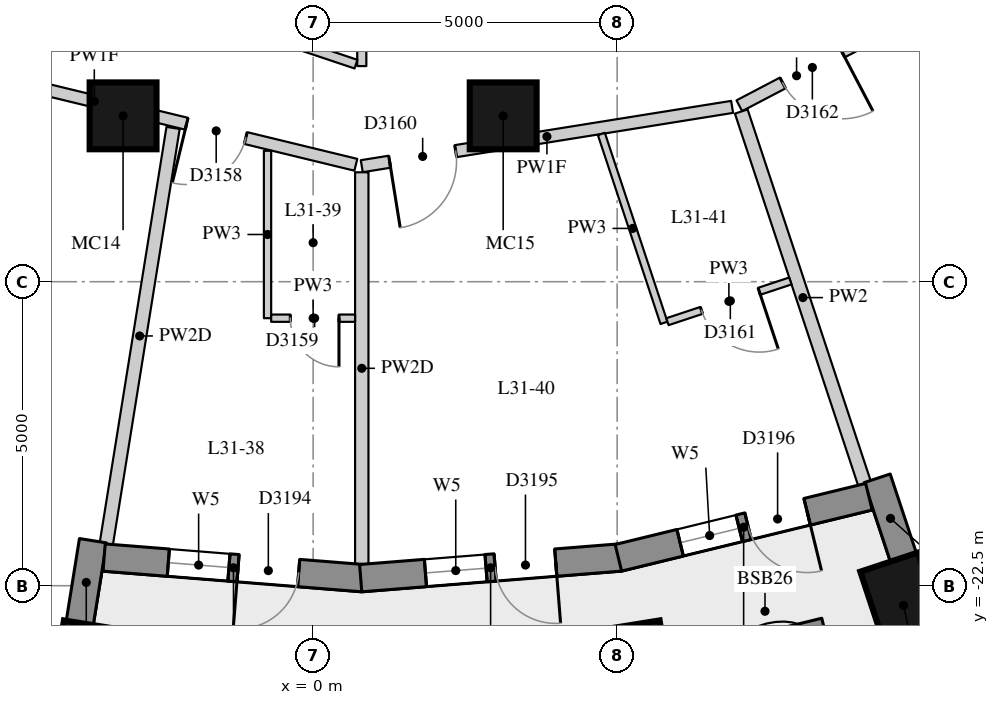
"""IFC4 building model, lengths in metres.
Left out: names, types, materials, properties, quantities, classifications, styles, units other than length and angle.
Written with IfcOpenShell. Run it as: python <this file> out.ifc"""

import sys

from ifc_helpers import new_model, si_unit, direction, frame, frame_2d, origin, origin_2d, place, context, subcontext, project, spatial, rectangle, extrude, element, fill, save


model = new_model("IFC4")
c1 = context("Model", 3, precision=1e-05, world=origin(), true_north=direction((0.0, 1.0)))
c2 = subcontext(c1, "Body", "Model", "MODEL_VIEW")
j1 = project(units=[si_unit("LENGTHUNIT", "METRE"), si_unit("PLANEANGLEUNIT", "RADIAN")], contexts=[c1])
p1 = place(None, origin())
s1 = spatial("IfcSite", under=j1, at=p1, CompositionType="ELEMENT")
p2 = place(p1, origin())
s2 = spatial("IfcBuilding", under=s1, at=p2, CompositionType="ELEMENT")
p3 = place(p2, frame((0.0, 0.0, 112.0)))
s3 = spatial("IfcBuildingStorey", under=s2, at=p3, CompositionType="ELEMENT", Elevation=112.0)
for number, where, z_axis, x_axis in (
    (1, (-3.724, -23.891, 0.0), (0.0, 0.0, 1.0), (-0.159, -0.987, 0.0)),
    (2, (5.323, -23.891, 0.0), (0.0, 0.0, 1.0), (0.159, -0.987, 0.0)),
    (3, (9.71, -22.824, 0.0), (0.0, 0.0, 1.0), (0.315, -0.949, 0.0)),
):
    element("IfcColumn", number, at=place(p3, frame(where, z_axis=z_axis, x_axis=x_axis)), inside=s3, PredefinedType="COLUMN", context=c2, shape_type="SweptSolid", body=[
        extrude(rectangle(XDim=1.5, YDim=1.0, at=origin_2d()), origin(), (0.0, 0.0, 1.0), 3.3),
    ])
for number, where, z_axis, x_axis in (
    (4, (-3.126, -14.772, 0.0), (0.0, 0.0, 1.0), (1.0, 0.0, 0.0)),
    (5, (3.126, -14.772, 0.0), (0.0, 0.0, 1.0), (1.0, 0.0, 0.0)),
):
    element("IfcColumn", number, at=place(p3, frame(where, z_axis=z_axis, x_axis=x_axis)), inside=s3, PredefinedType="COLUMN", context=c2, shape_type="SweptSolid", body=[
        extrude(rectangle(XDim=1.1, YDim=1.1, at=origin_2d()), origin(), (0.0, 0.0, 1.0), 3.3),
    ])
p4 = place(p3, frame((-3.841, -23.132, 0.0), z_axis=(0.0, 0.0, 1.0), x_axis=(0.158442643832, 0.987368182906, 0.0)))
e6 = element("IfcWall", 6, at=p4, inside=s3, PredefinedType="SOLIDWALL", context=c2, shape_type="SweptSolid", body=[
    extrude(rectangle(XDim=1.39, YDim=0.45, at=frame_2d((0.695, 0.0))), origin(), (0.0, 0.0, 1.0), 2.47),
])
p5 = place(p3, frame((9.714, -22.053, 0.0), z_axis=(0.0, 0.0, 1.0), x_axis=(-0.314647068585, 0.949208734805, 0.0)))
e7 = element("IfcWall", 7, at=p5, inside=s3, PredefinedType="SOLIDWALL", context=c2, shape_type="SweptSolid", body=[
    extrude(rectangle(XDim=1.39, YDim=0.45, at=frame_2d((0.695, 0.0))), origin(), (0.0, 0.0, 1.0), 3.02),
])
p6 = place(p3, frame((-3.438, -22.037, 0.0), z_axis=(0.0, 0.0, 1.0), x_axis=(0.996844307919, -0.079381520332, 0.0)))
e8 = element("IfcWall", 8, at=p6, inside=s3, PredefinedType="SOLIDWALL", context=c2, shape_type="SweptSolid", body=[
    extrude(rectangle(XDim=4.269, YDim=0.45, at=frame_2d((2.134, 0.0))), origin(), (0.0, 0.0, 1.0), 3.02),
])
p7 = place(p6, frame((1.06, 0.0, 0.4)))
e9 = element("IfcOpeningElement", 9, at=p7, cuts=e8, PredefinedType="OPENING", context=c2, shape_type="SweptSolid", body=[
    extrude(rectangle(XDim=1.0, YDim=1.75, at=frame_2d((0.5, 0.875))), frame((0.0, 0.235, 0.0), z_axis=(0.0, -1.0, 0.0), x_axis=(1.0, 0.0, 0.0)), (0.0, 0.0, 1.0), 0.47),
])
p8 = place(p6, frame((2.209, 0.0, 0.0)))
e10 = element("IfcOpeningElement", 10, at=p8, cuts=e8, PredefinedType="OPENING", context=c2, shape_type="SweptSolid", body=[
    extrude(rectangle(XDim=1.0, YDim=2.15, at=frame_2d((0.5, 1.075))), frame((0.0, 0.235, 0.0), z_axis=(0.0, -1.0, 0.0), x_axis=(1.0, 0.0, 0.0)), (0.0, 0.0, 1.0), 0.47),
])
p9 = place(p3, frame((0.782, -22.376, 0.0), z_axis=(0.0, 0.0, 1.0), x_axis=(0.996843465986, 0.079392092303, 0.0)))
e11 = element("IfcWall", 11, at=p9, inside=s3, PredefinedType="SOLIDWALL", context=c2, shape_type="SweptSolid", body=[
    extrude(rectangle(XDim=4.287, YDim=0.45, at=frame_2d((2.143, 0.0))), origin(), (0.0, 0.0, 1.0), 3.02),
])
p10 = place(p9, frame((1.068, 0.0, 0.4)))
e12 = element("IfcOpeningElement", 12, at=p10, cuts=e11, PredefinedType="OPENING", context=c2, shape_type="SweptSolid", body=[
    extrude(rectangle(XDim=1.0, YDim=1.75, at=frame_2d((0.5, 0.875))), frame((0.0, 0.235, 0.0), z_axis=(0.0, -1.0, 0.0), x_axis=(1.0, 0.0, 0.0)), (0.0, 0.0, 1.0), 0.47),
])
p11 = place(p9, frame((2.219, 0.0, 0.0)))
e13 = element("IfcOpeningElement", 13, at=p11, cuts=e11, PredefinedType="OPENING", context=c2, shape_type="SweptSolid", body=[
    extrude(rectangle(XDim=1.0, YDim=2.15, at=frame_2d((0.5, 1.075))), frame((0.0, 0.235, 0.0), z_axis=(0.0, -1.0, 0.0), x_axis=(1.0, 0.0, 0.0)), (0.0, 0.0, 1.0), 0.47),
])
p12 = place(p3, frame((5.02, -22.041, 0.0), z_axis=(0.0, 0.0, 1.0), x_axis=(0.971521631711, 0.236950879125, 0.0)))
e14 = element("IfcWall", 14, at=p12, inside=s3, PredefinedType="SOLIDWALL", context=c2, shape_type="SweptSolid", body=[
    extrude(rectangle(XDim=4.241, YDim=0.45, at=frame_2d((2.121, 0.0))), origin(), (0.0, 0.0, 1.0), 3.02),
])
p13 = place(p12, frame((1.045, 0.0, 0.4)))
e15 = element("IfcOpeningElement", 15, at=p13, cuts=e14, PredefinedType="OPENING", context=c2, shape_type="SweptSolid", body=[
    extrude(rectangle(XDim=1.0, YDim=1.75, at=frame_2d((0.5, 0.875))), frame((0.0, 0.235, 0.0), z_axis=(0.0, -1.0, 0.0), x_axis=(1.0, 0.0, 0.0)), (0.0, 0.0, 1.0), 0.47),
])
p14 = place(p12, frame((2.196, 0.0, 0.0)))
e16 = element("IfcOpeningElement", 16, at=p14, cuts=e14, PredefinedType="OPENING", context=c2, shape_type="SweptSolid", body=[
    extrude(rectangle(XDim=1.0, YDim=2.15, at=frame_2d((0.5, 1.075))), frame((0.0, 0.235, 0.0), z_axis=(0.0, -1.0, 0.0), x_axis=(1.0, 0.0, 0.0)), (0.0, 0.0, 1.0), 0.47),
])
p15 = place(p3, frame((6.699, -23.801, 0.0), z_axis=(0.0, 0.0, 1.0), x_axis=(0.971654974133, 0.23640349245, 0.0)))
e17 = element("IfcWall", 17, at=p15, inside=s3, PredefinedType="USERDEFINED", context=c2, shape_type="SweptSolid", body=[
    extrude(rectangle(XDim=1.8, YDim=0.7, at=frame_2d((0.9, 0.0))), origin(), (0.0, 0.0, 1.0), 0.75),
])
p16 = place(p3, frame((8.892, -13.619, 0.0), z_axis=(0.0, 0.0, 1.0), x_axis=(-0.885696642175, -0.464264426852, 0.0)))
e18 = element("IfcWall", 18, at=p16, inside=s3, PredefinedType="PARTITIONING", context=c2, shape_type="SweptSolid", body=[
    extrude(rectangle(XDim=2.126, YDim=0.2, at=frame_2d((1.063, 0.0))), origin(), (0.0, 0.0, 1.0), 3.02),
])
p17 = place(p16, frame((0.22, 0.0, 0.0)))
e19 = element("IfcOpeningElement", 19, at=p17, cuts=e18, PredefinedType="OPENING", context=c2, shape_type="SweptSolid", body=[
    extrude(rectangle(XDim=1.1, YDim=2.1, at=frame_2d((0.55, 1.05))), frame((0.0, 0.11, 0.0), z_axis=(0.0, -1.0, 0.0), x_axis=(1.0, 0.0, 0.0)), (0.0, 0.0, 1.0), 0.22),
])
p18 = place(p3, frame((6.891, -14.625, 0.0), z_axis=(0.0, 0.0, 1.0), x_axis=(-0.987419134366, -0.158124802253, 0.0)))
e20 = element("IfcWall", 20, at=p18, inside=s3, PredefinedType="PARTITIONING", context=c2, shape_type="SweptSolid", body=[
    extrude(rectangle(XDim=6.168, YDim=0.2, at=frame_2d((3.084, 0.0))), origin(), (0.0, 0.0, 1.0), 2.42),
])
p19 = place(p18, frame((4.604, 0.0, 0.0)))
e21 = element("IfcOpeningElement", 21, at=p19, cuts=e20, PredefinedType="OPENING", context=c2, shape_type="SweptSolid", body=[
    extrude(rectangle(XDim=1.1, YDim=2.1, at=frame_2d((0.55, 1.05))), frame((0.0, 0.11, 0.0), z_axis=(0.0, -1.0, 0.0), x_axis=(1.0, 0.0, 0.0)), (0.0, 0.0, 1.0), 0.22),
])
p20 = place(p3, frame((0.702, -15.577, 0.0), z_axis=(0.0, 0.0, 1.0), x_axis=(-0.971804733873, 0.235787105715, 0.0)))
e22 = element("IfcWall", 22, at=p20, inside=s3, PredefinedType="PARTITIONING", context=c2, shape_type="SweptSolid", body=[
    extrude(rectangle(XDim=8.852, YDim=0.2, at=frame_2d((4.426, 0.0))), origin(), (0.0, 0.0, 1.0), 2.42),
])
p21 = place(p20, frame((5.631, 0.0, 0.0)))
e23 = element("IfcOpeningElement", 23, at=p21, cuts=e22, PredefinedType="OPENING", context=c2, shape_type="SweptSolid", body=[
    extrude(rectangle(XDim=1.1, YDim=2.1, at=frame_2d((0.55, 1.05))), frame((0.0, 0.11, 0.0), z_axis=(0.0, -1.0, 0.0), x_axis=(1.0, 0.0, 0.0)), (0.0, 0.0, 1.0), 0.22),
])
p22 = place(p20, frame((1.863, 0.0, 0.0)))
e24 = element("IfcOpeningElement", 24, at=p22, cuts=e22, PredefinedType="OPENING", context=c2, shape_type="SweptSolid", body=[
    extrude(rectangle(XDim=1.0, YDim=2.1, at=frame_2d((0.5, 1.05))), frame((0.0, 0.11, 0.0), z_axis=(0.0, -1.0, 0.0), x_axis=(1.0, 0.0, 0.0)), (0.0, 0.0, 1.0), 0.22),
])
p23 = place(p3, frame((0.8, -9.23, 0.0), z_axis=(0.0, 0.0, 1.0), x_axis=(0.0, -1.0, 0.0)))
e25 = element("IfcWall", 25, at=p23, inside=s3, PredefinedType="PARTITIONING", context=c2, shape_type="SweptSolid", body=[
    extrude(rectangle(XDim=4.724, YDim=0.15, at=frame_2d((2.362, 0.0))), origin(), (0.0, 0.0, 1.0), 3.02),
])
p24 = place(p23, frame((1.912, 0.0, 0.0)))
e26 = element("IfcOpeningElement", 26, at=p24, cuts=e25, PredefinedType="OPENING", context=c2, shape_type="SweptSolid", body=[
    extrude(rectangle(XDim=0.9, YDim=2.1, at=frame_2d((0.45, 1.05))), frame((0.0, 0.085, 0.0), z_axis=(0.0, -1.0, 0.0), x_axis=(1.0, 0.0, 0.0)), (0.0, 0.0, 1.0), 0.17),
])
p25 = place(p3, frame((0.705, -13.922, 0.0), z_axis=(0.0, 0.0, 1.0), x_axis=(-0.948131483463, 0.317878420258, 0.0)))
e27 = element("IfcWall", 27, at=p25, inside=s3, PredefinedType="PARTITIONING", context=c2, shape_type="SweptSolid", body=[
    extrude(rectangle(XDim=3.46, YDim=0.15, at=frame_2d((1.73, 0.0))), origin(), (0.0, 0.0, 1.0), 3.02),
])
p26 = place(p3, frame((-3.402, -21.814, 0.0), z_axis=(0.0, 0.0, 1.0), x_axis=(0.158512534522, 0.987356965033, 0.0)))
e28 = element("IfcWall", 28, at=p26, inside=s3, PredefinedType="PARTITIONING", context=c2, shape_type="SweptSolid", body=[
    extrude(rectangle(XDim=6.931, YDim=0.22, at=frame_2d((3.465, 0.0))), origin(), (0.0, 0.0, 1.0), 2.47),
])
p27 = place(p3, frame((0.8, -22.149, 0.0), z_axis=(0.0, 0.0, 1.0), x_axis=(0.0, 1.0, 0.0)))
e29 = element("IfcWall", 29, at=p27, inside=s3, PredefinedType="PARTITIONING", context=c2, shape_type="SweptSolid", body=[
    extrude(rectangle(XDim=6.448, YDim=0.22, at=frame_2d((3.224, 0.0))), origin(), (0.0, 0.0, 1.0), 2.47),
])
p28 = place(p3, frame((9.069, -20.822, 0.0), z_axis=(0.0, 0.0, 1.0), x_axis=(-0.31452344537, 0.949249704932, 0.0)))
e30 = element("IfcWall", 30, at=p28, inside=s3, PredefinedType="PARTITIONING", context=c2, shape_type="SweptSolid", body=[
    extrude(rectangle(XDim=6.448, YDim=0.22, at=frame_2d((3.224, 0.0))), origin(), (0.0, 0.0, 1.0), 3.02),
])
p29 = place(p3, frame((-0.75, -15.347, 0.0), z_axis=(0.0, 0.0, 1.0), x_axis=(0.0, -1.0, 0.0)))
e31 = element("IfcWall", 31, at=p29, inside=s3, PredefinedType="PARTITIONING", context=c2, shape_type="SweptSolid", body=[
    extrude(rectangle(XDim=2.753, YDim=0.12, at=frame_2d((1.376, 0.0))), origin(), (0.0, 0.0, 1.0), 3.02),
])
p30 = place(p3, frame((4.74, -15.07, 0.0), z_axis=(0.0, 0.0, 1.0), x_axis=(0.314526308998, -0.949248756095, 0.0)))
e32 = element("IfcWall", 32, at=p30, inside=s3, PredefinedType="PARTITIONING", context=c2, shape_type="SweptSolid", body=[
    extrude(rectangle(XDim=3.272, YDim=0.12, at=frame_2d((1.636, 0.0))), origin(), (0.0, 0.0, 1.0), 3.02),
])
p31 = place(p3, frame((-0.69, -18.1, 0.0), z_axis=(0.0, 0.0, 1.0), x_axis=(1.0, 0.0, 0.0)))
e33 = element("IfcWall", 33, at=p31, inside=s3, PredefinedType="PARTITIONING", context=c2, shape_type="SweptSolid", body=[
    extrude(rectangle(XDim=1.38, YDim=0.12, at=frame_2d((0.69, 0.0))), origin(), (0.0, 0.0, 1.0), 3.02),
])
p32 = place(p31, frame((0.315, 0.0, 0.0)))
e34 = element("IfcOpeningElement", 34, at=p32, cuts=e33, PredefinedType="OPENING", context=c2, shape_type="SweptSolid", body=[
    extrude(rectangle(XDim=0.8, YDim=2.1, at=frame_2d((0.4, 1.05))), frame((0.0, 0.07, 0.0), z_axis=(0.0, -1.0, 0.0), x_axis=(1.0, 0.0, 0.0)), (0.0, 0.0, 1.0), 0.14),
])
p33 = place(p3, frame((5.827, -18.158, 0.0), z_axis=(0.0, 0.0, 1.0), x_axis=(0.94926636949, 0.314473146318, 0.0)))
e35 = element("IfcWall", 35, at=p33, inside=s3, PredefinedType="PARTITIONING", context=c2, shape_type="SweptSolid", body=[
    extrude(rectangle(XDim=2.13, YDim=0.12, at=frame_2d((1.065, 0.0))), origin(), (0.0, 0.0, 1.0), 3.02),
])
p34 = place(p33, frame((0.59, 0.0, 0.0)))
e36 = element("IfcOpeningElement", 36, at=p34, cuts=e35, PredefinedType="OPENING", context=c2, shape_type="SweptSolid", body=[
    extrude(rectangle(XDim=1.0, YDim=2.1, at=frame_2d((0.5, 1.05))), frame((0.0, 0.07, 0.0), z_axis=(0.0, -1.0, 0.0), x_axis=(1.0, 0.0, 0.0)), (0.0, 0.0, 1.0), 0.14),
])
p35 = place(p7, origin())
e37 = element("IfcWindow", 37, at=p35, inside=s3, PartitioningType="SINGLE_PANEL", PredefinedType="WINDOW", context=c2, shape_type="SweptSolid", body=[
    extrude(rectangle(XDim=1.0, YDim=1.75, at=frame_2d((0.5, 0.875))), frame((0.0, 0.035, 0.0), z_axis=(0.0, -1.0, 0.0), x_axis=(1.0, 0.0, 0.0)), (0.0, 0.0, 1.0), 0.06),
])
fill(e9, e37)
p36 = place(p8, frame((1.0, 0.0, 0.0), z_axis=(0.0, 0.0, 1.0), x_axis=(-1.0, 0.0, 0.0)))
e38 = element("IfcDoor", 38, at=p36, inside=s3, OperationType="SINGLE_SWING_RIGHT", PredefinedType="DOOR", context=c2, shape_type="SweptSolid", body=[
    extrude(rectangle(XDim=1.0, YDim=2.15, at=frame_2d((0.5, 1.075))), frame((0.0, 0.075, 0.0), z_axis=(0.0, -1.0, 0.0), x_axis=(1.0, 0.0, 0.0)), (0.0, 0.0, 1.0), 0.05),
])
fill(e10, e38)
p37 = place(p10, origin())
e39 = element("IfcWindow", 39, at=p37, inside=s3, PartitioningType="SINGLE_PANEL", PredefinedType="WINDOW", context=c2, shape_type="SweptSolid", body=[
    extrude(rectangle(XDim=1.0, YDim=1.75, at=frame_2d((0.5, 0.875))), frame((0.0, 0.035, 0.0), z_axis=(0.0, -1.0, 0.0), x_axis=(1.0, 0.0, 0.0)), (0.0, 0.0, 1.0), 0.06),
])
fill(e12, e39)
p38 = place(p11, frame((1.0, 0.0, 0.0), z_axis=(0.0, 0.0, 1.0), x_axis=(-1.0, 0.0, 0.0)))
e40 = element("IfcDoor", 40, at=p38, inside=s3, OperationType="SINGLE_SWING_LEFT", PredefinedType="DOOR", context=c2, shape_type="SweptSolid", body=[
    extrude(rectangle(XDim=1.0, YDim=2.15, at=frame_2d((0.5, 1.075))), frame((0.0, 0.075, 0.0), z_axis=(0.0, -1.0, 0.0), x_axis=(1.0, 0.0, 0.0)), (0.0, 0.0, 1.0), 0.05),
])
fill(e13, e40)
p39 = place(p13, origin())
e41 = element("IfcWindow", 41, at=p39, inside=s3, PartitioningType="SINGLE_PANEL", PredefinedType="WINDOW", context=c2, shape_type="SweptSolid", body=[
    extrude(rectangle(XDim=1.0, YDim=1.75, at=frame_2d((0.5, 0.875))), frame((0.0, 0.035, 0.0), z_axis=(0.0, -1.0, 0.0), x_axis=(1.0, 0.0, 0.0)), (0.0, 0.0, 1.0), 0.06),
])
fill(e15, e41)
p40 = place(p14, frame((1.0, 0.0, 0.0), z_axis=(0.0, 0.0, 1.0), x_axis=(-1.0, 0.0, 0.0)))
e42 = element("IfcDoor", 42, at=p40, inside=s3, OperationType="SINGLE_SWING_LEFT", PredefinedType="DOOR", context=c2, shape_type="SweptSolid", body=[
    extrude(rectangle(XDim=1.0, YDim=2.15, at=frame_2d((0.5, 1.075))), frame((0.0, 0.075, 0.0), z_axis=(0.0, -1.0, 0.0), x_axis=(1.0, 0.0, 0.0)), (0.0, 0.0, 1.0), 0.05),
])
fill(e16, e42)
p41 = place(p22, origin())
e43 = element("IfcDoor", 43, at=p41, inside=s3, OperationType="SINGLE_SWING_RIGHT", PredefinedType="DOOR", context=c2, shape_type="SweptSolid", body=[
    extrude(rectangle(XDim=1.0, YDim=2.1, at=frame_2d((0.5, 1.05))), frame((0.0, 0.025, 0.0), z_axis=(0.0, -1.0, 0.0), x_axis=(1.0, 0.0, 0.0)), (0.0, 0.0, 1.0), 0.05),
])
fill(e24, e43)
p42 = place(p32, origin())
e44 = element("IfcDoor", 44, at=p42, inside=s3, OperationType="SINGLE_SWING_LEFT", PredefinedType="DOOR", context=c2, shape_type="SweptSolid", body=[
    extrude(rectangle(XDim=0.8, YDim=2.1, at=frame_2d((0.4, 1.05))), frame((0.0, 0.025, 0.0), z_axis=(0.0, -1.0, 0.0), x_axis=(1.0, 0.0, 0.0)), (0.0, 0.0, 1.0), 0.05),
])
fill(e34, e44)
p43 = place(p19, origin())
e45 = element("IfcDoor", 45, at=p43, inside=s3, OperationType="SINGLE_SWING_RIGHT", PredefinedType="DOOR", context=c2, shape_type="SweptSolid", body=[
    extrude(rectangle(XDim=1.1, YDim=2.1, at=frame_2d((0.55, 1.05))), frame((0.0, 0.025, 0.0), z_axis=(0.0, -1.0, 0.0), x_axis=(1.0, 0.0, 0.0)), (0.0, 0.0, 1.0), 0.05),
])
fill(e21, e45)
p44 = place(p34, origin())
e46 = element("IfcDoor", 46, at=p44, inside=s3, OperationType="SINGLE_SWING_LEFT", PredefinedType="DOOR", context=c2, shape_type="SweptSolid", body=[
    extrude(rectangle(XDim=1.0, YDim=2.1, at=frame_2d((0.5, 1.05))), frame((0.0, 0.025, 0.0), z_axis=(0.0, -1.0, 0.0), x_axis=(1.0, 0.0, 0.0)), (0.0, 0.0, 1.0), 0.05),
])
fill(e36, e46)
p45 = place(p17, origin())
e47 = element("IfcDoor", 47, at=p45, inside=s3, OperationType="SINGLE_SWING_LEFT", PredefinedType="DOOR", context=c2, shape_type="SweptSolid", body=[
    extrude(rectangle(XDim=1.1, YDim=2.1, at=frame_2d((0.55, 1.05))), frame((0.0, 0.025, 0.0), z_axis=(0.0, -1.0, 0.0), x_axis=(1.0, 0.0, 0.0)), (0.0, 0.0, 1.0), 0.05),
])
fill(e19, e47)
save(model, sys.argv[1])
